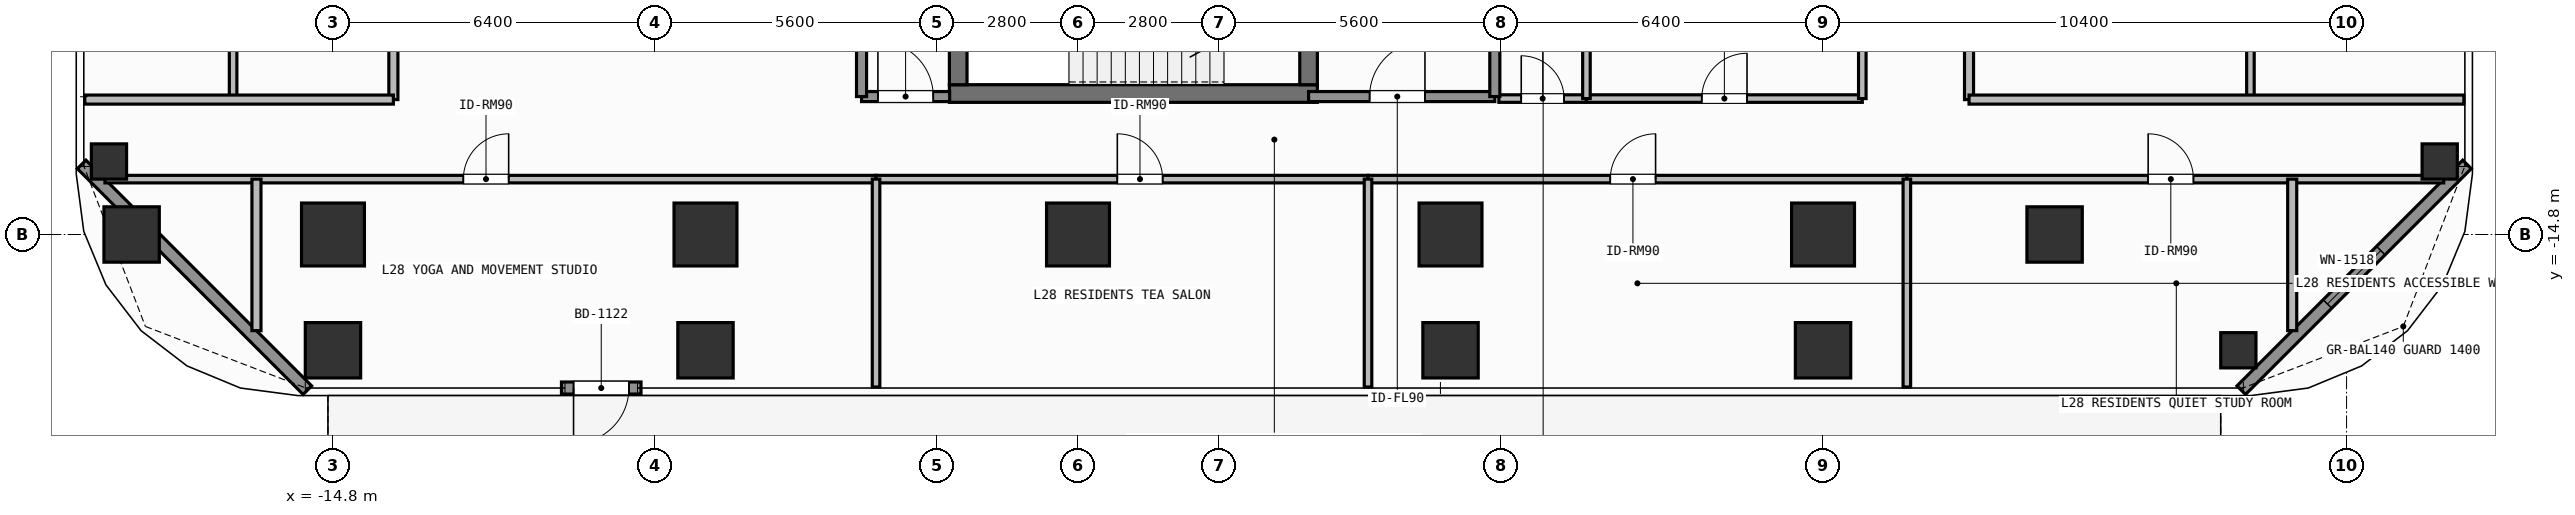
"""IFC4 building model, lengths in metres.
Left out: names, types, materials, properties, quantities, classifications, styles, units other than length and angle.
Written with IfcOpenShell. Run it as: python <this file> out.ifc"""

import sys

from ifc_helpers import new_model, si_unit, direction, frame, frame_2d, origin, origin_2d, place, context, subcontext, project, spatial, rectangle, hollow_rectangle, extrude, element, fill, save


model = new_model("IFC4")
c1 = context("Model", 3, precision=1e-05, world=origin(), true_north=direction((0.0, 1.0)))
c2 = subcontext(c1, "Body", "Model", "MODEL_VIEW")
j1 = project(units=[si_unit("LENGTHUNIT", "METRE"), si_unit("PLANEANGLEUNIT", "RADIAN")], contexts=[c1])
p1 = place(None, origin())
s1 = spatial("IfcSite", under=j1, at=p1, CompositionType="ELEMENT")
p2 = place(p1, origin())
s2 = spatial("IfcBuilding", under=s1, at=p2, CompositionType="ELEMENT")
p3 = place(p2, frame((0.0, 0.0, 113.4)))
s3 = spatial("IfcBuildingStorey", under=s2, at=p3, CompositionType="ELEMENT", Elevation=113.4)
p4 = place(p3, frame((-2.555, -12.0, 0.0), z_axis=(0.0, 0.0, 1.0), x_axis=(1.0, 0.0, 0.0)))
e1 = element("IfcWall", 1, at=p4, inside=s3, PredefinedType="SHEAR", context=c2, shape_type="SweptSolid", body=[
    extrude(rectangle(XDim=7.31, YDim=0.35, at=frame_2d((3.655, 0.0))), origin(), (0.0, 0.0, 1.0), 3.9),
])
p5 = place(p3, frame((-2.38, -11.825, 0.0), z_axis=(0.0, 0.0, 1.0), x_axis=(0.0, 1.0, 0.0)))
e2 = element("IfcWall", 2, at=p5, inside=s3, PredefinedType="SHEAR", context=c2, shape_type="SweptSolid", body=[
    extrude(rectangle(XDim=2.925, YDim=0.35, at=frame_2d((1.462, 0.0))), origin(), (0.0, 0.0, 1.0), 3.9),
])
p6 = place(p3, frame((4.58, -8.9, 0.0), z_axis=(0.0, 0.0, 1.0), x_axis=(0.0, -1.0, 0.0)))
e3 = element("IfcWall", 3, at=p6, inside=s3, PredefinedType="SHEAR", context=c2, shape_type="SweptSolid", body=[
    extrude(rectangle(XDim=2.925, YDim=0.35, at=frame_2d((1.462, 0.0))), origin(), (0.0, 0.0, 1.0), 3.9),
])
p7 = place(p6, frame((0.913, 0.0, 0.0)))
e4 = element("IfcOpeningElement", 4, at=p7, cuts=e3, PredefinedType="OPENING", context=c2, shape_type="SweptSolid", body=[
    extrude(rectangle(XDim=1.1, YDim=2.15, at=frame_2d((0.55, 1.075))), frame((0.0, 0.185, 0.0), z_axis=(0.0, -1.0, 0.0), x_axis=(1.0, 0.0, 0.0)), (0.0, 0.0, 1.0), 0.37),
])
for number, where, z_axis, x_axis in (
    (5, (-14.8, -14.8, 0.0), (0.0, 0.0, 1.0), (1.0, 0.0, 0.0)),
    (6, (-7.4, -14.8, 0.0), (0.0, 0.0, 1.0), (1.0, 0.0, 0.0)),
    (7, (0.0, -14.8, 0.0), (0.0, 0.0, 1.0), (1.0, 0.0, 0.0)),
    (8, (7.4, -14.8, 0.0), (0.0, 0.0, 1.0), (1.0, 0.0, 0.0)),
    (9, (14.8, -14.8, 0.0), (0.0, 0.0, 1.0), (1.0, 0.0, 0.0)),
):
    element("IfcColumn", number, at=place(p3, frame(where, z_axis=z_axis, x_axis=x_axis)), inside=s3, PredefinedType="COLUMN", context=c2, shape_type="SweptSolid", body=[
        extrude(rectangle(XDim=1.25, YDim=1.25, at=origin_2d()), origin(), (0.0, 0.0, 1.0), 3.9),
    ])
for number, where, z_axis, x_axis in (
    (10, (-18.8, -14.8, 0.0), (0.0, 0.0, 1.0), (1.0, 0.0, 0.0)),
    (11, (19.4, -14.8, 0.0), (0.0, 0.0, 1.0), (1.0, 0.0, 0.0)),
    (12, (-14.8, -17.1, 0.0), (0.0, 0.0, 1.0), (1.0, 0.0, 0.0)),
    (13, (-7.4, -17.1, 0.0), (0.0, 0.0, 1.0), (1.0, 0.0, 0.0)),
    (14, (7.4, -17.1, 0.0), (0.0, 0.0, 1.0), (1.0, 0.0, 0.0)),
    (15, (14.8, -17.1, 0.0), (0.0, 0.0, 1.0), (1.0, 0.0, 0.0)),
):
    element("IfcColumn", number, at=place(p3, frame(where, z_axis=z_axis, x_axis=x_axis)), inside=s3, PredefinedType="COLUMN", context=c2, shape_type="SweptSolid", body=[
        extrude(rectangle(XDim=1.1, YDim=1.1, at=origin_2d()), origin(), (0.0, 0.0, 1.0), 3.9),
    ])
for number, where, z_axis, x_axis in (
    (16, (23.05, -17.1, 0.0), (0.0, 0.0, 1.0), (1.0, 0.0, 0.0)),
    (17, (-19.25, -13.35, 0.0), (0.0, 0.0, 1.0), (1.0, 0.0, 0.0)),
    (18, (27.05, -13.35, 0.0), (0.0, 0.0, 1.0), (1.0, 0.0, 0.0)),
):
    element("IfcColumn", number, at=place(p3, frame(where, z_axis=z_axis, x_axis=x_axis)), inside=s3, PredefinedType="COLUMN", context=c2, shape_type="SweptSolid", body=[
        extrude(hollow_rectangle(XDim=0.7, YDim=0.7, WallThickness=0.032, at=origin_2d()), origin(), (0.0, 0.0, 1.0), 3.9),
    ])
p8 = place(p3, frame((-8.681, -17.85, 0.0), z_axis=(0.0, 0.0, 1.0), x_axis=(-1.0, 0.0, 0.0)))
e19 = element("IfcWall", 19, at=p8, inside=s3, PredefinedType="SOLIDWALL", context=c2, shape_type="SweptSolid", body=[
    extrude(rectangle(XDim=1.58, YDim=0.24, at=frame_2d((0.79, 0.0))), origin(), (0.0, 0.0, 1.0), 3.68),
])
p9 = place(p8, frame((0.24, 0.0, 0.0)))
e20 = element("IfcOpeningElement", 20, at=p9, cuts=e19, PredefinedType="OPENING", context=c2, shape_type="SweptSolid", body=[
    extrude(rectangle(XDim=1.1, YDim=2.2, at=frame_2d((0.55, 1.1))), frame((0.0, 0.13, 0.0), z_axis=(0.0, -1.0, 0.0), x_axis=(1.0, 0.0, 0.0)), (0.0, 0.0, 1.0), 0.26),
])
p10 = place(p3, frame((-15.308, -17.892, 0.0), z_axis=(0.0, 0.0, 1.0), x_axis=(-0.707126027686, 0.707087534163, 0.0)))
e21 = element("IfcWall", 21, at=p10, inside=s3, PredefinedType="SOLIDWALL", context=c2, shape_type="SweptSolid", body=[
    extrude(rectangle(XDim=6.342, YDim=0.24, at=frame_2d((3.171, 0.0))), origin(), (0.0, 0.0, 1.0), 3.68),
])
p11 = place(p3, frame((27.592, -13.408, 0.0), z_axis=(0.0, 0.0, 1.0), x_axis=(-0.707106781187, -0.707106781187, 0.0)))
e22 = element("IfcWall", 22, at=p11, inside=s3, PredefinedType="SOLIDWALL", context=c2, shape_type="SweptSolid", body=[
    extrude(rectangle(XDim=6.342, YDim=0.24, at=frame_2d((3.171, 0.0))), origin(), (0.0, 0.0, 1.0), 3.68),
])
p12 = place(p11, frame((2.421, 0.0, 0.8)))
e23 = element("IfcOpeningElement", 23, at=p12, cuts=e22, PredefinedType="OPENING", context=c2, shape_type="SweptSolid", body=[
    extrude(rectangle(XDim=1.5, YDim=1.85, at=frame_2d((0.75, 0.925))), frame((0.0, 0.13, 0.0), z_axis=(0.0, -1.0, 0.0), x_axis=(1.0, 0.0, 0.0)), (0.0, 0.0, 1.0), 0.26),
])
p13 = place(p3, frame((4.58, -12.06, 0.0), z_axis=(0.0, 0.0, 1.0), x_axis=(1.0, 0.0, 0.0)))
e24 = element("IfcWall", 24, at=p13, inside=s3, PredefinedType="SOLIDWALL", context=c2, shape_type="SweptSolid", body=[
    extrude(rectangle(XDim=3.7, YDim=0.2, at=frame_2d((1.85, 0.0))), origin(), (0.0, 0.0, 1.0), 3.68),
])
p14 = place(p13, frame((1.212, 0.0, 0.0)))
e25 = element("IfcOpeningElement", 25, at=p14, cuts=e24, PredefinedType="OPENING", context=c2, shape_type="SweptSolid", body=[
    extrude(rectangle(XDim=1.1, YDim=2.15, at=frame_2d((0.55, 1.075))), frame((0.0, 0.11, 0.0), z_axis=(0.0, -1.0, 0.0), x_axis=(1.0, 0.0, 0.0)), (0.0, 0.0, 1.0), 0.22),
])
p15 = place(p3, frame((-4.3, -12.06, 0.0), z_axis=(0.0, 0.0, 1.0), x_axis=(1.0, 0.0, 0.0)))
e26 = element("IfcWall", 26, at=p15, inside=s3, PredefinedType="SOLIDWALL", context=c2, shape_type="SweptSolid", body=[
    extrude(rectangle(XDim=1.75, YDim=0.2, at=frame_2d((0.875, 0.0))), origin(), (0.0, 0.0, 1.0), 3.68),
])
p16 = place(p15, frame((0.325, 0.0, 0.0)))
e27 = element("IfcOpeningElement", 27, at=p16, cuts=e26, PredefinedType="OPENING", context=c2, shape_type="SweptSolid", body=[
    extrude(rectangle(XDim=1.1, YDim=2.15, at=frame_2d((0.55, 1.075))), frame((0.0, 0.11, 0.0), z_axis=(0.0, -1.0, 0.0), x_axis=(1.0, 0.0, 0.0)), (0.0, 0.0, 1.0), 0.22),
])
p17 = place(p3, frame((8.36, -12.1, 0.0), z_axis=(0.0, 0.0, 1.0), x_axis=(1.0, 0.0, 0.0)))
e28 = element("IfcWall", 28, at=p17, inside=s3, PredefinedType="PARTITIONING", context=c2, shape_type="SweptSolid", body=[
    extrude(rectangle(XDim=1.74, YDim=0.15, at=frame_2d((0.87, 0.0))), origin(), (0.0, 0.0, 1.0), 3.68),
])
p18 = place(p17, frame((0.445, 0.0, 0.0)))
e29 = element("IfcOpeningElement", 29, at=p18, cuts=e28, PredefinedType="OPENING", context=c2, shape_type="SweptSolid", body=[
    extrude(rectangle(XDim=0.85, YDim=2.1, at=frame_2d((0.425, 1.05))), frame((0.0, 0.085, 0.0), z_axis=(0.0, -1.0, 0.0), x_axis=(1.0, 0.0, 0.0)), (0.0, 0.0, 1.0), 0.17),
])
p19 = place(p3, frame((10.1, -12.1, 0.0), z_axis=(0.0, 0.0, 1.0), x_axis=(1.0, 0.0, 0.0)))
e30 = element("IfcWall", 30, at=p19, inside=s3, PredefinedType="PARTITIONING", context=c2, shape_type="SweptSolid", body=[
    extrude(rectangle(XDim=5.48, YDim=0.15, at=frame_2d((2.74, 0.0))), origin(), (0.0, 0.0, 1.0), 3.68),
])
p20 = place(p19, frame((2.29, 0.0, 0.0)))
e31 = element("IfcOpeningElement", 31, at=p20, cuts=e30, PredefinedType="OPENING", context=c2, shape_type="SweptSolid", body=[
    extrude(rectangle(XDim=0.9, YDim=2.1, at=frame_2d((0.45, 1.05))), frame((0.0, 0.085, 0.0), z_axis=(0.0, -1.0, 0.0), x_axis=(1.0, 0.0, 0.0)), (0.0, 0.0, 1.0), 0.17),
])
p21 = place(p3, frame((-19.33, -13.7, 0.0), z_axis=(0.0, 0.0, 1.0), x_axis=(1.0, 0.0, 0.0)))
e32 = element("IfcWall", 32, at=p21, inside=s3, PredefinedType="PARTITIONING", context=c2, shape_type="SweptSolid", body=[
    extrude(rectangle(XDim=15.318, YDim=0.15, at=frame_2d((7.659, 0.0))), origin(), (0.0, 0.0, 1.0), 3.68),
])
p22 = place(p21, frame((7.12, 0.0, 0.0)))
e33 = element("IfcOpeningElement", 33, at=p22, cuts=e32, PredefinedType="OPENING", context=c2, shape_type="SweptSolid", body=[
    extrude(rectangle(XDim=0.9, YDim=2.1, at=frame_2d((0.45, 1.05))), frame((0.0, 0.085, 0.0), z_axis=(0.0, -1.0, 0.0), x_axis=(1.0, 0.0, 0.0)), (0.0, 0.0, 1.0), 0.17),
])
p23 = place(p3, frame((-4.012, -13.7, 0.0), z_axis=(0.0, 0.0, 1.0), x_axis=(1.0, 0.0, 0.0)))
e34 = element("IfcWall", 34, at=p23, inside=s3, PredefinedType="PARTITIONING", context=c2, shape_type="SweptSolid", body=[
    extrude(rectangle(XDim=9.773, YDim=0.15, at=frame_2d((4.886, 0.0))), origin(), (0.0, 0.0, 1.0), 3.68),
])
p24 = place(p23, frame((4.793, 0.0, 0.0)))
e35 = element("IfcOpeningElement", 35, at=p24, cuts=e34, PredefinedType="OPENING", context=c2, shape_type="SweptSolid", body=[
    extrude(rectangle(XDim=0.9, YDim=2.1, at=frame_2d((0.45, 1.05))), frame((0.0, 0.085, 0.0), z_axis=(0.0, -1.0, 0.0), x_axis=(1.0, 0.0, 0.0)), (0.0, 0.0, 1.0), 0.17),
])
p25 = place(p3, frame((5.761, -13.7, 0.0), z_axis=(0.0, 0.0, 1.0), x_axis=(1.0, 0.0, 0.0)))
e36 = element("IfcWall", 36, at=p25, inside=s3, PredefinedType="PARTITIONING", context=c2, shape_type="SweptSolid", body=[
    extrude(rectangle(XDim=10.704, YDim=0.15, at=frame_2d((5.352, 0.0))), origin(), (0.0, 0.0, 1.0), 3.68),
])
p26 = place(p25, frame((4.812, 0.0, 0.0)))
e37 = element("IfcOpeningElement", 37, at=p26, cuts=e36, PredefinedType="OPENING", context=c2, shape_type="SweptSolid", body=[
    extrude(rectangle(XDim=0.9, YDim=2.1, at=frame_2d((0.45, 1.05))), frame((0.0, 0.085, 0.0), z_axis=(0.0, -1.0, 0.0), x_axis=(1.0, 0.0, 0.0)), (0.0, 0.0, 1.0), 0.17),
])
p27 = place(p3, frame((16.465, -13.7, 0.0), z_axis=(0.0, 0.0, 1.0), x_axis=(1.0, 0.0, 0.0)))
e38 = element("IfcWall", 38, at=p27, inside=s3, PredefinedType="PARTITIONING", context=c2, shape_type="SweptSolid", body=[
    extrude(rectangle(XDim=10.665, YDim=0.15, at=frame_2d((5.333, 0.0))), origin(), (0.0, 0.0, 1.0), 3.68),
])
p28 = place(p27, frame((4.793, 0.0, 0.0)))
e39 = element("IfcOpeningElement", 39, at=p28, cuts=e38, PredefinedType="OPENING", context=c2, shape_type="SweptSolid", body=[
    extrude(rectangle(XDim=0.9, YDim=2.1, at=frame_2d((0.45, 1.05))), frame((0.0, 0.085, 0.0), z_axis=(0.0, -1.0, 0.0), x_axis=(1.0, 0.0, 0.0)), (0.0, 0.0, 1.0), 0.17),
])
p29 = place(p3, frame((-13.6, -12.12, 0.0), z_axis=(0.0, 0.0, 1.0), x_axis=(0.0, 1.0, 0.0)))
e40 = element("IfcWall", 40, at=p29, inside=s3, PredefinedType="PARTITIONING", context=c2, shape_type="SweptSolid", body=[
    extrude(rectangle(XDim=13.138, YDim=0.18, at=frame_2d((6.569, 0.0))), origin(), (0.0, 0.0, 1.0), 3.68),
])
p30 = place(p29, frame((5.711, 0.0, 0.0)))
e41 = element("IfcOpeningElement", 41, at=p30, cuts=e40, PredefinedType="OPENING", context=c2, shape_type="SweptSolid", body=[
    extrude(rectangle(XDim=1.0, YDim=2.2, at=frame_2d((0.5, 1.1))), frame((0.0, 0.1, 0.0), z_axis=(0.0, -1.0, 0.0), x_axis=(1.0, 0.0, 0.0)), (0.0, 0.0, 1.0), 0.2),
])
p31 = place(p3, frame((17.7, -12.12, 0.0), z_axis=(0.0, 0.0, 1.0), x_axis=(0.0, 1.0, 0.0)))
e42 = element("IfcWall", 42, at=p31, inside=s3, PredefinedType="PARTITIONING", context=c2, shape_type="SweptSolid", body=[
    extrude(rectangle(XDim=24.24, YDim=0.18, at=frame_2d((12.12, 0.0))), origin(), (0.0, 0.0, 1.0), 3.68),
])
p32 = place(p31, frame((11.62, 0.0, 0.0)))
e43 = element("IfcOpeningElement", 43, at=p32, cuts=e42, PredefinedType="OPENING", context=c2, shape_type="SweptSolid", body=[
    extrude(rectangle(XDim=1.0, YDim=2.2, at=frame_2d((0.5, 1.1))), frame((0.0, 0.1, 0.0), z_axis=(0.0, -1.0, 0.0), x_axis=(1.0, 0.0, 0.0)), (0.0, 0.0, 1.0), 0.2),
])
for number, where, z_axis, x_axis in (
    (44, (8.28, -12.06, 0.0), (0.0, 0.0, 1.0), (0.0, 1.0, 0.0)),
    (45, (-4.3, -12.06, 0.0), (0.0, 0.0, 1.0), (0.0, 1.0, 0.0)),
):
    element("IfcWall", number, at=place(p3, frame(where, z_axis=z_axis, x_axis=x_axis)), inside=s3, PredefinedType="SOLIDWALL", context=c2, shape_type="SweptSolid", body=[
        extrude(rectangle(XDim=3.185, YDim=0.2, at=frame_2d((1.593, 0.0))), origin(), (0.0, 0.0, 1.0), 3.68),
    ])
p33 = place(p3, frame((10.1, -12.1, 0.0), z_axis=(0.0, 0.0, 1.0), x_axis=(0.0, 1.0, 0.0)))
e46 = element("IfcWall", 46, at=p33, inside=s3, PredefinedType="PARTITIONING", context=c2, shape_type="SweptSolid", body=[
    extrude(rectangle(XDim=2.35, YDim=0.15, at=frame_2d((1.175, 0.0))), origin(), (0.0, 0.0, 1.0), 3.68),
])
p34 = place(p3, frame((15.58, -12.1, 0.0), z_axis=(0.0, 0.0, 1.0), x_axis=(0.0, 1.0, 0.0)))
e47 = element("IfcWall", 47, at=p34, inside=s3, PredefinedType="PARTITIONING", context=c2, shape_type="SweptSolid", body=[
    extrude(rectangle(XDim=6.25, YDim=0.15, at=frame_2d((3.125, 0.0))), origin(), (0.0, 0.0, 1.0), 3.68),
])
for number, where, z_axis, x_axis in (
    (48, (-16.32, -16.71, 0.0), (0.0, 0.0, 1.0), (0.0, 1.0, 0.0)),
    (49, (24.12, -16.71, 0.0), (0.0, 0.0, 1.0), (0.0, 1.0, 0.0)),
):
    element("IfcWall", number, at=place(p3, frame(where, z_axis=z_axis, x_axis=x_axis)), inside=s3, PredefinedType="PARTITIONING", context=c2, shape_type="SweptSolid", body=[
        extrude(rectangle(XDim=3.01, YDim=0.18, at=frame_2d((1.505, 0.0))), origin(), (0.0, 0.0, 1.0), 3.68),
    ])
for number, where, z_axis, x_axis in (
    (50, (-4.012, -17.83, 0.0), (0.0, 0.0, 1.0), (0.0, 1.0, 0.0)),
    (51, (5.761, -17.83, 0.0), (0.0, 0.0, 1.0), (0.0, 1.0, 0.0)),
    (52, (16.465, -17.83, 0.0), (0.0, 0.0, 1.0), (0.0, 1.0, 0.0)),
):
    element("IfcWall", number, at=place(p3, frame(where, z_axis=z_axis, x_axis=x_axis)), inside=s3, PredefinedType="PARTITIONING", context=c2, shape_type="SweptSolid", body=[
        extrude(rectangle(XDim=4.13, YDim=0.15, at=frame_2d((2.065, 0.0))), origin(), (0.0, 0.0, 1.0), 3.68),
    ])
p35 = place(p3, frame((-16.784, -12.12, 0.0), z_axis=(0.0, 0.0, 1.0), x_axis=(0.0, 1.0, 0.0)))
e53 = element("IfcWall", 53, at=p35, inside=s3, PredefinedType="PARTITIONING", context=c2, shape_type="SweptSolid", body=[
    extrude(rectangle(XDim=3.726, YDim=0.15, at=frame_2d((1.863, 0.0))), origin(), (0.0, 0.0, 1.0), 3.68),
])
p36 = place(p3, frame((-19.73, -12.12, 0.0), z_axis=(0.0, 0.0, 1.0), x_axis=(1.0, 0.0, 0.0)))
e54 = element("IfcWall", 54, at=p36, inside=s3, PredefinedType="PARTITIONING", context=c2, shape_type="SweptSolid", body=[
    extrude(rectangle(XDim=6.13, YDim=0.18, at=frame_2d((3.065, 0.0))), origin(), (0.0, 0.0, 1.0), 3.68),
])
p37 = place(p3, frame((23.29, -12.12, 0.0), z_axis=(0.0, 0.0, 1.0), x_axis=(0.0, 1.0, 0.0)))
e55 = element("IfcWall", 55, at=p37, inside=s3, PredefinedType="PARTITIONING", context=c2, shape_type="SweptSolid", body=[
    extrude(rectangle(XDim=6.684, YDim=0.15, at=frame_2d((3.342, 0.0))), origin(), (0.0, 0.0, 1.0), 3.68),
])
p38 = place(p3, frame((17.7, -12.12, 0.0), z_axis=(0.0, 0.0, 1.0), x_axis=(1.0, 0.0, 0.0)))
e56 = element("IfcWall", 56, at=p38, inside=s3, PredefinedType="PARTITIONING", context=c2, shape_type="SweptSolid", body=[
    extrude(rectangle(XDim=9.83, YDim=0.18, at=frame_2d((4.915, 0.0))), origin(), (0.0, 0.0, 1.0), 3.68),
])
p39 = place(p9, origin())
e57 = element("IfcDoor", 57, at=p39, inside=s3, OperationType="SINGLE_SWING_RIGHT", PredefinedType="DOOR", context=c2, shape_type="SweptSolid", body=[
    extrude(rectangle(XDim=1.1, YDim=2.2, at=frame_2d((0.55, 1.1))), frame((0.0, 0.025, 0.0), z_axis=(0.0, -1.0, 0.0), x_axis=(1.0, 0.0, 0.0)), (0.0, 0.0, 1.0), 0.05),
])
fill(e20, e57)
p40 = place(p12, origin())
e58 = element("IfcWindow", 58, at=p40, inside=s3, PartitioningType="SINGLE_PANEL", PredefinedType="WINDOW", context=c2, shape_type="SweptSolid", body=[
    extrude(rectangle(XDim=1.5, YDim=1.85, at=frame_2d((0.75, 0.925))), frame((0.0, 0.03, 0.0), z_axis=(0.0, -1.0, 0.0), x_axis=(1.0, 0.0, 0.0)), (0.0, 0.0, 1.0), 0.06),
])
fill(e23, e58)
p41 = place(p14, origin())
e59 = element("IfcDoor", 59, at=p41, inside=s3, OperationType="SINGLE_SWING_RIGHT", PredefinedType="DOOR", context=c2, shape_type="SweptSolid", body=[
    extrude(rectangle(XDim=1.1, YDim=2.15, at=frame_2d((0.55, 1.075))), frame((0.0, 0.025, 0.0), z_axis=(0.0, -1.0, 0.0), x_axis=(1.0, 0.0, 0.0)), (0.0, 0.0, 1.0), 0.05),
])
fill(e25, e59)
p42 = place(p16, origin())
e60 = element("IfcDoor", 60, at=p42, inside=s3, OperationType="SINGLE_SWING_LEFT", PredefinedType="DOOR", context=c2, shape_type="SweptSolid", body=[
    extrude(rectangle(XDim=1.1, YDim=2.15, at=frame_2d((0.55, 1.075))), frame((0.0, 0.025, 0.0), z_axis=(0.0, -1.0, 0.0), x_axis=(1.0, 0.0, 0.0)), (0.0, 0.0, 1.0), 0.05),
])
fill(e27, e60)
p43 = place(p18, origin())
e61 = element("IfcDoor", 61, at=p43, inside=s3, OperationType="SINGLE_SWING_LEFT", PredefinedType="DOOR", context=c2, shape_type="SweptSolid", body=[
    extrude(rectangle(XDim=0.85, YDim=2.1, at=frame_2d((0.425, 1.05))), frame((0.0, 0.025, 0.0), z_axis=(0.0, -1.0, 0.0), x_axis=(1.0, 0.0, 0.0)), (0.0, 0.0, 1.0), 0.05),
])
fill(e29, e61)
p44 = place(p20, origin())
e62 = element("IfcDoor", 62, at=p44, inside=s3, OperationType="SINGLE_SWING_RIGHT", PredefinedType="DOOR", context=c2, shape_type="SweptSolid", body=[
    extrude(rectangle(XDim=0.9, YDim=2.1, at=frame_2d((0.45, 1.05))), frame((0.0, 0.025, 0.0), z_axis=(0.0, -1.0, 0.0), x_axis=(1.0, 0.0, 0.0)), (0.0, 0.0, 1.0), 0.05),
])
fill(e31, e62)
p45 = place(p22, origin())
e63 = element("IfcDoor", 63, at=p45, inside=s3, OperationType="SINGLE_SWING_RIGHT", PredefinedType="DOOR", context=c2, shape_type="SweptSolid", body=[
    extrude(rectangle(XDim=0.9, YDim=2.1, at=frame_2d((0.45, 1.05))), frame((0.0, 0.025, 0.0), z_axis=(0.0, -1.0, 0.0), x_axis=(1.0, 0.0, 0.0)), (0.0, 0.0, 1.0), 0.05),
])
fill(e33, e63)
p46 = place(p24, origin())
e64 = element("IfcDoor", 64, at=p46, inside=s3, OperationType="SINGLE_SWING_LEFT", PredefinedType="DOOR", context=c2, shape_type="SweptSolid", body=[
    extrude(rectangle(XDim=0.9, YDim=2.1, at=frame_2d((0.45, 1.05))), frame((0.0, 0.025, 0.0), z_axis=(0.0, -1.0, 0.0), x_axis=(1.0, 0.0, 0.0)), (0.0, 0.0, 1.0), 0.05),
])
fill(e35, e64)
p47 = place(p26, origin())
e65 = element("IfcDoor", 65, at=p47, inside=s3, OperationType="SINGLE_SWING_RIGHT", PredefinedType="DOOR", context=c2, shape_type="SweptSolid", body=[
    extrude(rectangle(XDim=0.9, YDim=2.1, at=frame_2d((0.45, 1.05))), frame((0.0, 0.025, 0.0), z_axis=(0.0, -1.0, 0.0), x_axis=(1.0, 0.0, 0.0)), (0.0, 0.0, 1.0), 0.05),
])
fill(e37, e65)
p48 = place(p28, origin())
e66 = element("IfcDoor", 66, at=p48, inside=s3, OperationType="SINGLE_SWING_LEFT", PredefinedType="DOOR", context=c2, shape_type="SweptSolid", body=[
    extrude(rectangle(XDim=0.9, YDim=2.1, at=frame_2d((0.45, 1.05))), frame((0.0, 0.025, 0.0), z_axis=(0.0, -1.0, 0.0), x_axis=(1.0, 0.0, 0.0)), (0.0, 0.0, 1.0), 0.05),
])
fill(e39, e66)
save(model, sys.argv[1])
